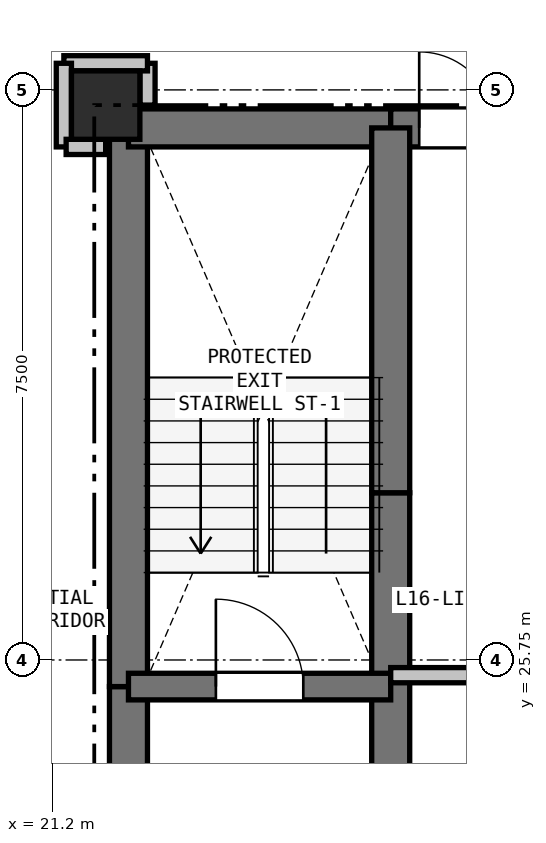
"""IFC4 building model, lengths in metres.
Left out: names, types, materials, properties, quantities, classifications, styles, units other than length and angle.
Written with IfcOpenShell. Run it as: python <this file> out.ifc"""

import sys

from ifc_helpers import new_model, si_unit, direction, frame, frame_2d, origin, origin_2d, place, context, subcontext, project, spatial, rectangle, extrude, element, fill, save


model = new_model("IFC4")
c1 = context("Model", 3, precision=1e-05, world=origin(), true_north=direction((0.0, 1.0)))
c2 = subcontext(c1, "Body", "Model", "MODEL_VIEW")
j1 = project(units=[si_unit("LENGTHUNIT", "METRE"), si_unit("PLANEANGLEUNIT", "RADIAN")], contexts=[c1])
p1 = place(None, origin())
s1 = spatial("IfcSite", under=j1, at=p1, CompositionType="ELEMENT")
p2 = place(p1, origin())
s2 = spatial("IfcBuilding", under=s1, at=p2, CompositionType="ELEMENT")
p3 = place(p2, frame((0.0, 0.0, 58.8)))
s3 = spatial("IfcBuildingStorey", under=s2, at=p3, CompositionType="ELEMENT", Elevation=58.8)
p4 = place(p3, frame((21.9, 33.05, 0.0), z_axis=(0.0, 0.0, 1.0), x_axis=(1.0, 0.0, 0.0)))
e1 = element("IfcColumn", 1, at=p4, inside=s3, PredefinedType="COLUMN", context=c2, shape_type="SweptSolid", body=[
    extrude(rectangle(XDim=0.9, YDim=0.9, at=origin_2d()), origin(), (0.0, 0.0, 1.0), 3.3),
])
p5 = place(p3, frame((22.2, 20.75, 0.0), z_axis=(0.0, 0.0, 1.0), x_axis=(0.0, 1.0, 0.0)))
e2 = element("IfcWall", 2, at=p5, inside=s3, PredefinedType="SHEAR", context=c2, shape_type="SweptSolid", body=[
    extrude(rectangle(XDim=4.65, YDim=0.5, at=frame_2d((2.325, 0.0))), origin(), (0.0, 0.0, 1.0), 3.02),
])
p6 = place(p3, frame((22.2, 25.4, 0.0), z_axis=(0.0, 0.0, 1.0), x_axis=(0.0, 1.0, 0.0)))
e3 = element("IfcWall", 3, at=p6, inside=s3, PredefinedType="SHEAR", context=c2, shape_type="SweptSolid", body=[
    extrude(rectangle(XDim=7.35, YDim=0.5, at=frame_2d((3.675, 0.0))), origin(), (0.0, 0.0, 1.0), 3.02),
])
p7 = place(p3, frame((22.2, 32.75, 0.0), z_axis=(0.0, 0.0, 1.0), x_axis=(1.0, 0.0, 0.0)))
e4 = element("IfcWall", 4, at=p7, inside=s3, PredefinedType="SHEAR", context=c2, shape_type="SweptSolid", body=[
    extrude(rectangle(XDim=3.45, YDim=0.5, at=frame_2d((1.725, 0.0))), origin(), (0.0, 0.0, 1.0), 3.02),
])
p8 = place(p3, frame((25.65, 32.75, 0.0), z_axis=(0.0, 0.0, 1.0), x_axis=(1.0, 0.0, 0.0)))
e5 = element("IfcWall", 5, at=p8, inside=s3, PredefinedType="SHEAR", context=c2, shape_type="SweptSolid", body=[
    extrude(rectangle(XDim=1.75, YDim=0.5, at=frame_2d((0.875, 0.0))), origin(), (0.0, 0.0, 1.0), 3.02),
])
p9 = place(p8, frame((0.375, 0.0, 0.0)))
e6 = element("IfcOpeningElement", 6, at=p9, cuts=e5, PredefinedType="OPENING", context=c2, shape_type="SweptSolid", body=[
    extrude(rectangle(XDim=1.0, YDim=2.15, at=frame_2d((0.5, 1.075))), frame((0.0, 0.26, 0.0), z_axis=(0.0, -1.0, 0.0), x_axis=(1.0, 0.0, 0.0)), (0.0, 0.0, 1.0), 0.52),
])
p10 = place(p3, frame((25.65, 22.75, 0.0), z_axis=(0.0, 0.0, 1.0), x_axis=(0.0, 1.0, 0.0)))
e7 = element("IfcWall", 7, at=p10, inside=s3, PredefinedType="SHEAR", context=c2, shape_type="SweptSolid", body=[
    extrude(rectangle(XDim=2.8, YDim=0.5, at=frame_2d((1.4, 0.0))), origin(), (0.0, 0.0, 1.0), 3.02),
])
p11 = place(p3, frame((25.65, 25.55, 0.0), z_axis=(0.0, 0.0, 1.0), x_axis=(0.0, 1.0, 0.0)))
e8 = element("IfcWall", 8, at=p11, inside=s3, PredefinedType="SHEAR", context=c2, shape_type="SweptSolid", body=[
    extrude(rectangle(XDim=2.4, YDim=0.5, at=frame_2d((1.2, 0.0))), origin(), (0.0, 0.0, 1.0), 3.02),
])
p12 = place(p3, frame((25.65, 27.95, 0.0), z_axis=(0.0, 0.0, 1.0), x_axis=(0.0, 1.0, 0.0)))
e9 = element("IfcWall", 9, at=p12, inside=s3, PredefinedType="SHEAR", context=c2, shape_type="SweptSolid", body=[
    extrude(rectangle(XDim=4.8, YDim=0.5, at=frame_2d((2.4, 0.0))), origin(), (0.0, 0.0, 1.0), 3.02),
])
p13 = place(p3, frame((22.2, 25.4, 0.0), z_axis=(0.0, 0.0, 1.0), x_axis=(1.0, 0.0, 0.0)))
e10 = element("IfcWall", 10, at=p13, inside=s3, PredefinedType="SHEAR", context=c2, shape_type="SweptSolid", body=[
    extrude(rectangle(XDim=3.45, YDim=0.35, at=frame_2d((1.725, 0.0))), origin(), (0.0, 0.0, 1.0), 3.02),
])
p14 = place(p13, frame((1.15, 0.0, 0.0)))
e11 = element("IfcOpeningElement", 11, at=p14, cuts=e10, PredefinedType="OPENING", context=c2, shape_type="SweptSolid", body=[
    extrude(rectangle(XDim=1.15, YDim=2.15, at=frame_2d((0.575, 1.075))), frame((0.0, 0.185, 0.0), z_axis=(0.0, -1.0, 0.0), x_axis=(1.0, 0.0, 0.0)), (0.0, 0.0, 1.0), 0.37),
])
p15 = place(p3, frame((25.65, 25.55, 0.0), z_axis=(0.0, 0.0, 1.0), x_axis=(1.0, 0.0, 0.0)))
e12 = element("IfcWall", 12, at=p15, inside=s3, PredefinedType="PARTITIONING", context=c2, shape_type="SweptSolid", body=[
    extrude(rectangle(XDim=4.95, YDim=0.2, at=frame_2d((2.475, 0.0))), origin(), (0.0, 0.0, 1.0), 3.02),
])
p16 = place(p3, frame((22.45, 33.05, 0.0), z_axis=(0.0, 0.0, 1.0), x_axis=(0.0, 1.0, 0.0)))
e13 = element("IfcWall", 13, at=p16, inside=s3, PredefinedType="PARTITIONING", context=c2, shape_type="SweptSolid", body=[
    extrude(rectangle(XDim=0.55, YDim=0.2, at=frame_2d((0.275, 0.0))), origin(), (0.0, 0.0, 1.0), 2.468),
])
p17 = place(p3, frame((22.45, 33.6, 0.0), z_axis=(0.0, 0.0, 1.0), x_axis=(-1.0, 0.0, 0.0)))
e14 = element("IfcWall", 14, at=p17, inside=s3, PredefinedType="PARTITIONING", context=c2, shape_type="SweptSolid", body=[
    extrude(rectangle(XDim=1.1, YDim=0.2, at=frame_2d((0.55, 0.0))), origin(), (0.0, 0.0, 1.0), 3.02),
])
p18 = place(p3, frame((21.35, 33.6, 0.0), z_axis=(0.0, 0.0, 1.0), x_axis=(0.0, -1.0, 0.0)))
e15 = element("IfcWall", 15, at=p18, inside=s3, PredefinedType="PARTITIONING", context=c2, shape_type="SweptSolid", body=[
    extrude(rectangle(XDim=1.1, YDim=0.2, at=frame_2d((0.55, 0.0))), origin(), (0.0, 0.0, 1.0), 2.317),
])
p19 = place(p3, frame((21.38, 32.5, 0.0), z_axis=(0.0, 0.0, 1.0), x_axis=(1.0, 0.0, 0.0)))
e16 = element("IfcWall", 16, at=p19, inside=s3, PredefinedType="PARTITIONING", context=c2, shape_type="SweptSolid", body=[
    extrude(rectangle(XDim=0.52, YDim=0.2, at=frame_2d((0.26, 0.0))), origin(), (0.0, 0.0, 1.0), 2.468),
])
p20 = place(p9, origin())
e17 = element("IfcDoor", 17, at=p20, inside=s3, OperationType="SINGLE_SWING_LEFT", PredefinedType="DOOR", context=c2, shape_type="SweptSolid", body=[
    extrude(rectangle(XDim=1.0, YDim=2.15, at=frame_2d((0.5, 1.075))), frame((0.0, 0.025, 0.0), z_axis=(0.0, -1.0, 0.0), x_axis=(1.0, 0.0, 0.0)), (0.0, 0.0, 1.0), 0.05),
])
fill(e6, e17)
p21 = place(p14, origin())
e18 = element("IfcDoor", 18, at=p21, inside=s3, OperationType="SINGLE_SWING_LEFT", PredefinedType="DOOR", context=c2, shape_type="SweptSolid", body=[
    extrude(rectangle(XDim=1.15, YDim=2.15, at=frame_2d((0.575, 1.075))), frame((0.0, 0.025, 0.0), z_axis=(0.0, -1.0, 0.0), x_axis=(1.0, 0.0, 0.0)), (0.0, 0.0, 1.0), 0.05),
])
fill(e11, e18)
save(model, sys.argv[1])
